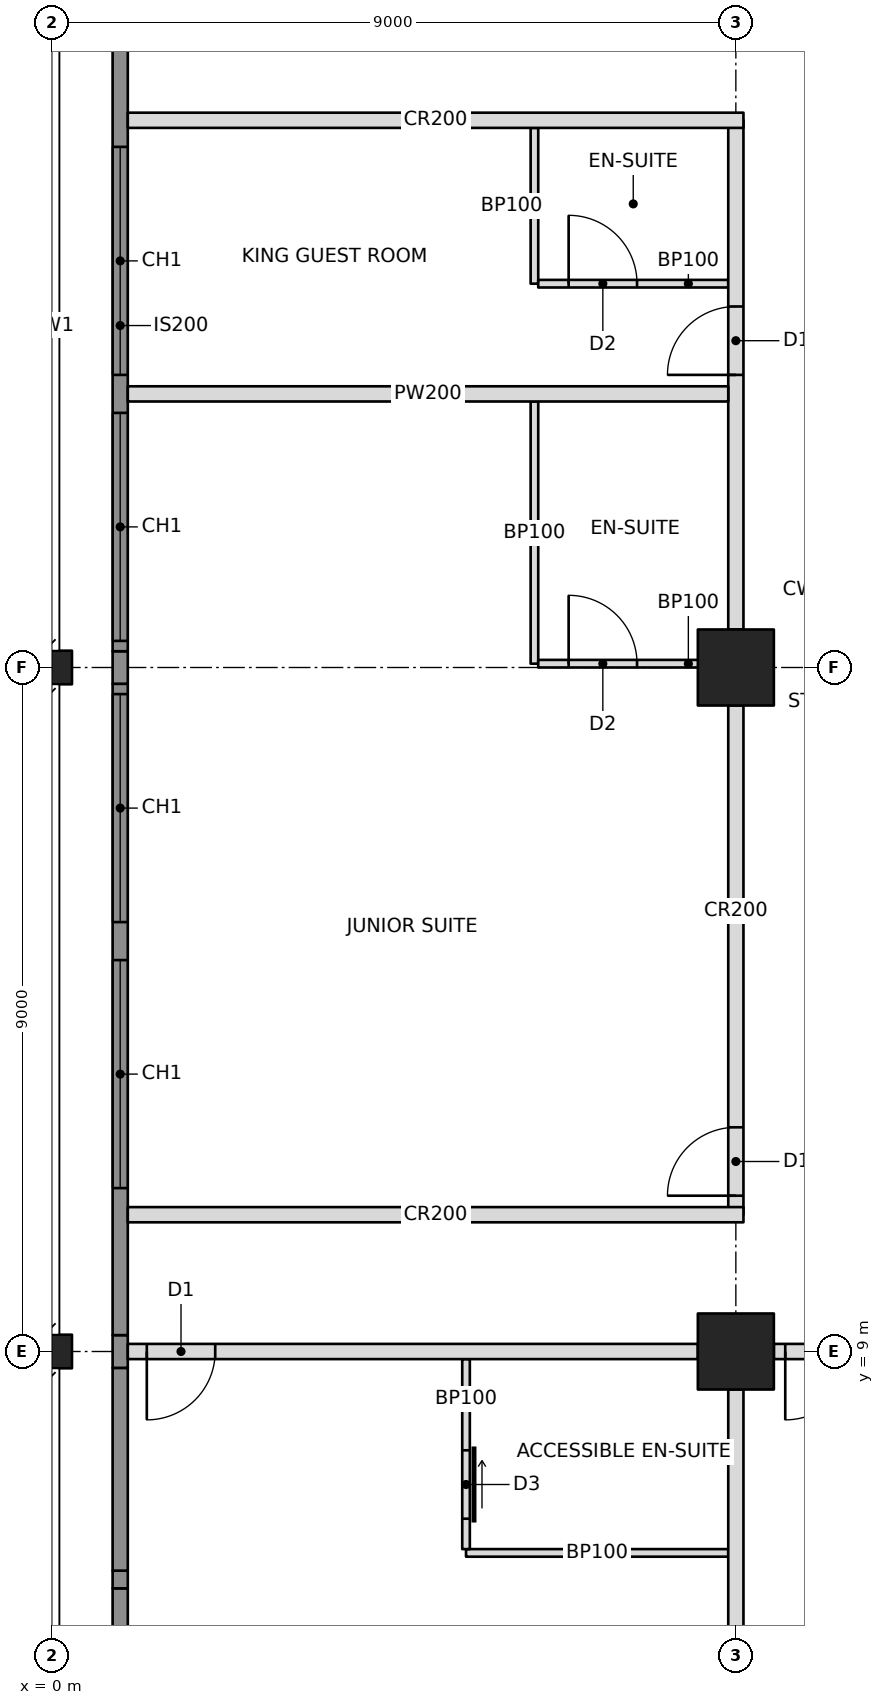
"""IFC4 building model, lengths in metres.
Left out: names, types, materials, properties, quantities, classifications, styles, units other than length and angle.
Written with IfcOpenShell. Run it as: python <this file> out.ifc"""

import sys

from ifc_helpers import new_model, si_unit, direction, frame, frame_2d, origin, origin_2d, place, context, subcontext, project, spatial, rectangle, hollow_rectangle, i_section, extrude, element, fill, save


model = new_model("IFC4")
c1 = context("Model", 3, precision=1e-05, world=origin(), true_north=direction((0.0, 1.0)))
c2 = subcontext(c1, "Body", "Model", "MODEL_VIEW")
j1 = project(units=[si_unit("LENGTHUNIT", "METRE"), si_unit("PLANEANGLEUNIT", "RADIAN")], contexts=[c1])
p1 = place(None, origin())
s1 = spatial("IfcSite", under=j1, at=p1, CompositionType="ELEMENT")
p2 = place(p1, origin())
s2 = spatial("IfcBuilding", under=s1, at=p2, CompositionType="ELEMENT")
p3 = place(p2, frame((0.0, 0.0, 152.0)))
s3 = spatial("IfcBuildingStorey", under=s2, at=p3, CompositionType="ELEMENT", Elevation=152.0)
for number, where, z_axis, x_axis in (
    (1, (0.0, 9.0, 0.0), (0.0, 0.0, 1.0), (0.0, 1.0, 0.0)),
    (2, (0.0, 18.0, 0.0), (0.0, 0.0, 1.0), (0.0, 1.0, 0.0)),
):
    element("IfcColumn", number, at=place(p3, frame(where, z_axis=z_axis, x_axis=x_axis)), inside=s3, PredefinedType="COLUMN", context=c2, shape_type="SweptSolid", body=[
        extrude(i_section(OverallWidth=0.442, OverallDepth=0.531, WebThickness=0.066, FlangeThickness=0.106, at=origin_2d()), origin(), (0.0, 0.0, 1.0), 3.4),
    ])
for number, where, z_axis, x_axis in (
    (3, (9.0, 9.0, 0.0), (0.0, 0.0, 1.0), (1.0, 0.0, 0.0)),
    (4, (9.0, 18.0, 0.0), (0.0, 0.0, 1.0), (1.0, 0.0, 0.0)),
):
    element("IfcColumn", number, at=place(p3, frame(where, z_axis=z_axis, x_axis=x_axis)), inside=s3, PredefinedType="COLUMN", context=c2, shape_type="SweptSolid", body=[
        extrude(hollow_rectangle(XDim=1.0, YDim=1.0, WallThickness=0.1, at=origin_2d()), origin(), (0.0, 0.0, 1.0), 3.4),
    ])
p4 = place(p3, frame((1.0, 9.0, 0.0), z_axis=(0.0, 0.0, 1.0), x_axis=(1.0, 0.0, 0.0)))
e5 = element("IfcWall", 5, at=p4, inside=s3, PredefinedType="PARTITIONING", context=c2, shape_type="SweptSolid", body=[
    extrude(rectangle(XDim=7.5, YDim=0.2, at=frame_2d((3.75, 0.0))), origin(), (0.0, 0.0, 1.0), 2.21),
])
p5 = place(p4, frame((0.25, 0.0, 0.0)))
e6 = element("IfcOpeningElement", 6, at=p5, cuts=e5, PredefinedType="OPENING", context=c2, shape_type="SweptSolid", body=[
    extrude(rectangle(XDim=0.9, YDim=2.1, at=frame_2d((0.45, 1.05))), frame((0.0, 0.11, 0.0), z_axis=(0.0, -1.0, 0.0), x_axis=(1.0, 0.0, 0.0)), (0.0, 0.0, 1.0), 0.22),
])
p6 = place(p3, frame((9.5, 9.0, 0.0), z_axis=(0.0, 0.0, 1.0), x_axis=(1.0, 0.0, 0.0)))
e7 = element("IfcWall", 7, at=p6, inside=s3, PredefinedType="PARTITIONING", context=c2, shape_type="SweptSolid", body=[
    extrude(rectangle(XDim=8.0, YDim=0.2, at=frame_2d((4.0, 0.0))), origin(), (0.0, 0.0, 1.0), 2.21),
])
p7 = place(p6, frame((0.15, 0.0, 0.0)))
e8 = element("IfcOpeningElement", 8, at=p7, cuts=e7, PredefinedType="OPENING", context=c2, shape_type="SweptSolid", body=[
    extrude(rectangle(XDim=0.9, YDim=2.1, at=frame_2d((0.45, 1.05))), frame((0.0, 0.11, 0.0), z_axis=(0.0, -1.0, 0.0), x_axis=(1.0, 0.0, 0.0)), (0.0, 0.0, 1.0), 0.22),
])
p8 = place(p3, frame((9.0, 10.8, 0.0), z_axis=(0.0, 0.0, 1.0), x_axis=(0.0, 1.0, 0.0)))
e9 = element("IfcWall", 9, at=p8, inside=s3, PredefinedType="PARTITIONING", context=c2, shape_type="SweptSolid", body=[
    extrude(rectangle(XDim=6.7, YDim=0.2, at=frame_2d((3.35, 0.0))), origin(), (0.0, 0.0, 1.0), 2.21),
])
p9 = place(p8, frame((0.25, 0.0, 0.0)))
e10 = element("IfcOpeningElement", 10, at=p9, cuts=e9, PredefinedType="OPENING", context=c2, shape_type="SweptSolid", body=[
    extrude(rectangle(XDim=0.9, YDim=2.1, at=frame_2d((0.45, 1.05))), frame((0.0, 0.11, 0.0), z_axis=(0.0, -1.0, 0.0), x_axis=(1.0, 0.0, 0.0)), (0.0, 0.0, 1.0), 0.22),
])
p10 = place(p3, frame((9.0, 18.5, 0.0), z_axis=(0.0, 0.0, 1.0), x_axis=(0.0, 1.0, 0.0)))
e11 = element("IfcWall", 11, at=p10, inside=s3, PredefinedType="PARTITIONING", context=c2, shape_type="SweptSolid", body=[
    extrude(rectangle(XDim=6.7, YDim=0.2, at=frame_2d((3.35, 0.0))), origin(), (0.0, 0.0, 1.0), 2.21),
])
p11 = place(p10, frame((3.35, 0.0, 0.0)))
e12 = element("IfcOpeningElement", 12, at=p11, cuts=e11, PredefinedType="OPENING", context=c2, shape_type="SweptSolid", body=[
    extrude(rectangle(XDim=0.9, YDim=2.1, at=frame_2d((0.45, 1.05))), frame((0.0, 0.11, 0.0), z_axis=(0.0, -1.0, 0.0), x_axis=(1.0, 0.0, 0.0)), (0.0, 0.0, 1.0), 0.22),
])
for number, where, z_axis, x_axis in (
    (13, (1.0, 10.8, 0.0), (0.0, 0.0, 1.0), (1.0, 0.0, 0.0)),
    (14, (1.0, 25.2, 0.0), (0.0, 0.0, 1.0), (1.0, 0.0, 0.0)),
):
    element("IfcWall", number, at=place(p3, frame(where, z_axis=z_axis, x_axis=x_axis)), inside=s3, PredefinedType="PARTITIONING", context=c2, shape_type="SweptSolid", body=[
        extrude(rectangle(XDim=8.1, YDim=0.2, at=frame_2d((4.05, 0.0))), origin(), (0.0, 0.0, 1.0), 2.21),
    ])
p12 = place(p3, frame((9.0, 8.5, 0.0), z_axis=(0.0, 0.0, 1.0), x_axis=(0.0, -1.0, 0.0)))
e15 = element("IfcWall", 15, at=p12, inside=s3, PredefinedType="PARTITIONING", context=c2, shape_type="SweptSolid", body=[
    extrude(rectangle(XDim=7.5, YDim=0.2, at=frame_2d((3.75, 0.0))), origin(), (0.0, 0.0, 1.0), 2.21),
])
p13 = place(p3, frame((5.45, 6.35, 0.0), z_axis=(0.0, 0.0, 1.0), x_axis=(1.0, 0.0, 0.0)))
e16 = element("IfcWall", 16, at=p13, inside=s3, PredefinedType="PARTITIONING", context=c2, shape_type="SweptSolid", body=[
    extrude(rectangle(XDim=3.45, YDim=0.1, at=frame_2d((1.725, 0.0))), origin(), (0.0, 0.0, 1.0), 2.21),
])
p14 = place(p3, frame((5.45, 8.9, 0.0), z_axis=(0.0, 0.0, 1.0), x_axis=(0.0, -1.0, 0.0)))
e17 = element("IfcWall", 17, at=p14, inside=s3, PredefinedType="PARTITIONING", context=c2, shape_type="SweptSolid", body=[
    extrude(rectangle(XDim=2.5, YDim=0.1, at=frame_2d((1.25, 0.0))), origin(), (0.0, 0.0, 1.0), 2.21),
])
p15 = place(p14, frame((1.2, 0.0, 0.0)))
e18 = element("IfcOpeningElement", 18, at=p15, cuts=e17, PredefinedType="OPENING", context=c2, shape_type="SweptSolid", body=[
    extrude(rectangle(XDim=0.9, YDim=2.1, at=frame_2d((0.45, 1.05))), frame((0.0, 0.06, 0.0), z_axis=(0.0, -1.0, 0.0), x_axis=(1.0, 0.0, 0.0)), (0.0, 0.0, 1.0), 0.12),
])
p16 = place(p3, frame((8.9, 21.6, 0.0), z_axis=(0.0, 0.0, 1.0), x_axis=(-1.0, 0.0, 0.0)))
e19 = element("IfcWall", 19, at=p16, inside=s3, PredefinedType="PARTITIONING", context=c2, shape_type="SweptSolid", body=[
    extrude(rectangle(XDim=7.9, YDim=0.2, at=frame_2d((3.95, 0.0))), origin(), (0.0, 0.0, 1.0), 2.21),
])
p17 = place(p3, frame((6.35, 18.05, 0.0), z_axis=(0.0, 0.0, 1.0), x_axis=(0.0, 1.0, 0.0)))
e20 = element("IfcWall", 20, at=p17, inside=s3, PredefinedType="PARTITIONING", context=c2, shape_type="SweptSolid", body=[
    extrude(rectangle(XDim=3.45, YDim=0.1, at=frame_2d((1.725, 0.0))), origin(), (0.0, 0.0, 1.0), 2.202),
])
p18 = place(p3, frame((8.9, 18.05, 0.0), z_axis=(0.0, 0.0, 1.0), x_axis=(-1.0, 0.0, 0.0)))
e21 = element("IfcWall", 21, at=p18, inside=s3, PredefinedType="PARTITIONING", context=c2, shape_type="SweptSolid", body=[
    extrude(rectangle(XDim=2.5, YDim=0.1, at=frame_2d((1.25, 0.0))), origin(), (0.0, 0.0, 1.0), 2.203),
])
p19 = place(p18, frame((1.2, 0.0, 0.0)))
e22 = element("IfcOpeningElement", 22, at=p19, cuts=e21, PredefinedType="OPENING", context=c2, shape_type="SweptSolid", body=[
    extrude(rectangle(XDim=0.9, YDim=2.1, at=frame_2d((0.45, 1.05))), frame((0.0, 0.06, 0.0), z_axis=(0.0, -1.0, 0.0), x_axis=(1.0, 0.0, 0.0)), (0.0, 0.0, 1.0), 0.12),
])
p20 = place(p3, frame((6.35, 23.05, 0.0), z_axis=(0.0, 0.0, 1.0), x_axis=(0.0, 1.0, 0.0)))
e23 = element("IfcWall", 23, at=p20, inside=s3, PredefinedType="PARTITIONING", context=c2, shape_type="SweptSolid", body=[
    extrude(rectangle(XDim=2.05, YDim=0.1, at=frame_2d((1.025, 0.0))), origin(), (0.0, 0.0, 1.0), 3.15),
])
p21 = place(p3, frame((8.9, 23.05, 0.0), z_axis=(0.0, 0.0, 1.0), x_axis=(-1.0, 0.0, 0.0)))
e24 = element("IfcWall", 24, at=p21, inside=s3, PredefinedType="PARTITIONING", context=c2, shape_type="SweptSolid", body=[
    extrude(rectangle(XDim=2.5, YDim=0.1, at=frame_2d((1.25, 0.0))), origin(), (0.0, 0.0, 1.0), 2.21),
])
p22 = place(p21, frame((1.2, 0.0, 0.0)))
e25 = element("IfcOpeningElement", 25, at=p22, cuts=e24, PredefinedType="OPENING", context=c2, shape_type="SweptSolid", body=[
    extrude(rectangle(XDim=0.9, YDim=2.1, at=frame_2d((0.45, 1.05))), frame((0.0, 0.06, 0.0), z_axis=(0.0, -1.0, 0.0), x_axis=(1.0, 0.0, 0.0)), (0.0, 0.0, 1.0), 0.12),
])
p23 = place(p3, frame((0.9, 3.116, 0.0), z_axis=(0.0, 0.0, 1.0), x_axis=(0.0, 1.0, 0.0)))
e26 = element("IfcWall", 26, at=p23, inside=s3, PredefinedType="SOLIDWALL", context=c2, shape_type="SweptSolid", body=[
    extrude(rectangle(XDim=2.768, YDim=0.2, at=frame_2d((1.384, 0.0))), origin(), (0.0, 0.0, 1.0), 3.15),
])
p24 = place(p3, frame((0.9, 5.884, 0.0), z_axis=(0.0, 0.0, 1.0), x_axis=(0.0, 1.0, 0.0)))
e27 = element("IfcWall", 27, at=p24, inside=s3, PredefinedType="SOLIDWALL", context=c2, shape_type="SweptSolid", body=[
    extrude(rectangle(XDim=0.232, YDim=0.2, at=frame_2d((0.116, 0.0))), origin(), (0.0, 0.0, 1.0), 2.542),
])
p25 = place(p3, frame((0.9, 6.116, 0.0), z_axis=(0.0, 0.0, 1.0), x_axis=(0.0, 1.0, 0.0)))
e28 = element("IfcWall", 28, at=p25, inside=s3, PredefinedType="SOLIDWALL", context=c2, shape_type="SweptSolid", body=[
    extrude(rectangle(XDim=2.668, YDim=0.2, at=frame_2d((1.334, 0.0))), origin(), (0.0, 0.0, 1.0), 3.15),
])
p26 = place(p3, frame((0.9, 8.785, 0.0), z_axis=(0.0, 0.0, 1.0), x_axis=(0.0, 1.0, 0.0)))
e29 = element("IfcWall", 29, at=p26, inside=s3, PredefinedType="SOLIDWALL", context=c2, shape_type="SweptSolid", body=[
    extrude(rectangle(XDim=0.431, YDim=0.2, at=frame_2d((0.215, 0.0))), origin(), (0.0, 0.0, 1.0), 2.21),
])
p27 = place(p3, frame((0.9, 9.215, 0.0), z_axis=(0.0, 0.0, 1.0), x_axis=(0.0, 1.0, 0.0)))
e30 = element("IfcWall", 30, at=p27, inside=s3, PredefinedType="SOLIDWALL", context=c2, shape_type="SweptSolid", body=[
    extrude(rectangle(XDim=8.571, YDim=0.2, at=frame_2d((4.285, 0.0))), origin(), (0.0, 0.0, 1.0), 3.15),
])
p28 = place(p27, frame((1.935, 0.0, 0.6)))
e31 = element("IfcOpeningElement", 31, at=p28, cuts=e30, PredefinedType="OPENING", context=c2, shape_type="SweptSolid", body=[
    extrude(rectangle(XDim=3.0, YDim=2.2, at=frame_2d((1.5, 1.1))), frame((0.0, 0.11, 0.0), z_axis=(0.0, -1.0, 0.0), x_axis=(1.0, 0.0, 0.0)), (0.0, 0.0, 1.0), 0.22),
])
p29 = place(p27, frame((5.435, 0.0, 0.6)))
e32 = element("IfcOpeningElement", 32, at=p29, cuts=e30, PredefinedType="OPENING", context=c2, shape_type="SweptSolid", body=[
    extrude(rectangle(XDim=3.0, YDim=2.2, at=frame_2d((1.5, 1.1))), frame((0.0, 0.11, 0.0), z_axis=(0.0, -1.0, 0.0), x_axis=(1.0, 0.0, 0.0)), (0.0, 0.0, 1.0), 0.22),
])
p30 = place(p3, frame((0.9, 17.786, 0.0), z_axis=(0.0, 0.0, 1.0), x_axis=(0.0, 1.0, 0.0)))
e33 = element("IfcWall", 33, at=p30, inside=s3, PredefinedType="SOLIDWALL", context=c2, shape_type="SweptSolid", body=[
    extrude(rectangle(XDim=0.428, YDim=0.2, at=frame_2d((0.214, 0.0))), origin(), (0.0, 0.0, 1.0), 2.202),
])
p31 = place(p3, frame((0.9, 18.214, 0.0), z_axis=(0.0, 0.0, 1.0), x_axis=(0.0, 1.0, 0.0)))
e34 = element("IfcWall", 34, at=p31, inside=s3, PredefinedType="SOLIDWALL", context=c2, shape_type="SweptSolid", body=[
    extrude(rectangle(XDim=8.571, YDim=0.2, at=frame_2d((4.285, 0.0))), origin(), (0.0, 0.0, 1.0), 3.15),
])
p32 = place(p31, frame((0.136, 0.0, 0.6)))
e35 = element("IfcOpeningElement", 35, at=p32, cuts=e34, PredefinedType="OPENING", context=c2, shape_type="SweptSolid", body=[
    extrude(rectangle(XDim=3.0, YDim=2.2, at=frame_2d((1.5, 1.1))), frame((0.0, 0.11, 0.0), z_axis=(0.0, -1.0, 0.0), x_axis=(1.0, 0.0, 0.0)), (0.0, 0.0, 1.0), 0.22),
])
p33 = place(p31, frame((3.636, 0.0, 0.6)))
e36 = element("IfcOpeningElement", 36, at=p33, cuts=e34, PredefinedType="OPENING", context=c2, shape_type="SweptSolid", body=[
    extrude(rectangle(XDim=3.0, YDim=2.2, at=frame_2d((1.5, 1.1))), frame((0.0, 0.11, 0.0), z_axis=(0.0, -1.0, 0.0), x_axis=(1.0, 0.0, 0.0)), (0.0, 0.0, 1.0), 0.22),
])
p34 = place(p28, origin())
e37 = element("IfcWindow", 37, at=p34, inside=s3, PartitioningType="TRIPLE_PANEL_VERTICAL", PredefinedType="WINDOW", context=c2, shape_type="SweptSolid", body=[
    extrude(rectangle(XDim=3.0, YDim=2.2, at=frame_2d((1.5, 1.1))), frame((0.0, 0.03, 0.0), z_axis=(0.0, -1.0, 0.0), x_axis=(1.0, 0.0, 0.0)), (0.0, 0.0, 1.0), 0.06),
])
fill(e31, e37)
p35 = place(p29, origin())
e38 = element("IfcWindow", 38, at=p35, inside=s3, PartitioningType="TRIPLE_PANEL_VERTICAL", PredefinedType="WINDOW", context=c2, shape_type="SweptSolid", body=[
    extrude(rectangle(XDim=3.0, YDim=2.2, at=frame_2d((1.5, 1.1))), frame((0.0, 0.03, 0.0), z_axis=(0.0, -1.0, 0.0), x_axis=(1.0, 0.0, 0.0)), (0.0, 0.0, 1.0), 0.06),
])
fill(e32, e38)
p36 = place(p32, origin())
e39 = element("IfcWindow", 39, at=p36, inside=s3, PartitioningType="TRIPLE_PANEL_VERTICAL", PredefinedType="WINDOW", context=c2, shape_type="SweptSolid", body=[
    extrude(rectangle(XDim=3.0, YDim=2.2, at=frame_2d((1.5, 1.1))), frame((0.0, 0.03, 0.0), z_axis=(0.0, -1.0, 0.0), x_axis=(1.0, 0.0, 0.0)), (0.0, 0.0, 1.0), 0.06),
])
fill(e35, e39)
p37 = place(p33, origin())
e40 = element("IfcWindow", 40, at=p37, inside=s3, PartitioningType="TRIPLE_PANEL_VERTICAL", PredefinedType="WINDOW", context=c2, shape_type="SweptSolid", body=[
    extrude(rectangle(XDim=3.0, YDim=2.2, at=frame_2d((1.5, 1.1))), frame((0.0, 0.03, 0.0), z_axis=(0.0, -1.0, 0.0), x_axis=(1.0, 0.0, 0.0)), (0.0, 0.0, 1.0), 0.06),
])
fill(e36, e40)
p38 = place(p15, origin())
e41 = element("IfcDoor", 41, at=p38, inside=s3, OperationType="SLIDING_TO_LEFT", PredefinedType="DOOR", context=c2, shape_type="SweptSolid", body=[
    extrude(rectangle(XDim=0.9, YDim=2.1, at=frame_2d((0.45, 1.05))), frame((0.0, 0.025, 0.0), z_axis=(0.0, -1.0, 0.0), x_axis=(1.0, 0.0, 0.0)), (0.0, 0.0, 1.0), 0.05),
])
fill(e18, e41)
p39 = place(p5, frame((0.9, 0.0, 0.0), z_axis=(0.0, 0.0, 1.0), x_axis=(-1.0, 0.0, 0.0)))
e42 = element("IfcDoor", 42, at=p39, inside=s3, OperationType="SINGLE_SWING_RIGHT", PredefinedType="DOOR", context=c2, shape_type="SweptSolid", body=[
    extrude(rectangle(XDim=0.9, YDim=2.1, at=frame_2d((0.45, 1.05))), frame((0.0, 0.025, 0.0), z_axis=(0.0, -1.0, 0.0), x_axis=(1.0, 0.0, 0.0)), (0.0, 0.0, 1.0), 0.05),
])
fill(e6, e42)
p40 = place(p7, frame((0.9, 0.0, 0.0), z_axis=(0.0, 0.0, 1.0), x_axis=(-1.0, 0.0, 0.0)))
e43 = element("IfcDoor", 43, at=p40, inside=s3, OperationType="SINGLE_SWING_RIGHT", PredefinedType="DOOR", context=c2, shape_type="SweptSolid", body=[
    extrude(rectangle(XDim=0.9, YDim=2.1, at=frame_2d((0.45, 1.05))), frame((0.0, 0.025, 0.0), z_axis=(0.0, -1.0, 0.0), x_axis=(1.0, 0.0, 0.0)), (0.0, 0.0, 1.0), 0.05),
])
fill(e8, e43)
p41 = place(p19, frame((0.9, 0.0, 0.0), z_axis=(0.0, 0.0, 1.0), x_axis=(-1.0, 0.0, 0.0)))
e44 = element("IfcDoor", 44, at=p41, inside=s3, OperationType="SINGLE_SWING_LEFT", PredefinedType="DOOR", context=c2, shape_type="SweptSolid", body=[
    extrude(rectangle(XDim=0.9, YDim=2.1, at=frame_2d((0.45, 1.05))), frame((0.0, 0.025, 0.0), z_axis=(0.0, -1.0, 0.0), x_axis=(1.0, 0.0, 0.0)), (0.0, 0.0, 1.0), 0.05),
])
fill(e22, e44)
p42 = place(p9, origin())
e45 = element("IfcDoor", 45, at=p42, inside=s3, OperationType="SINGLE_SWING_LEFT", PredefinedType="DOOR", context=c2, shape_type="SweptSolid", body=[
    extrude(rectangle(XDim=0.9, YDim=2.1, at=frame_2d((0.45, 1.05))), frame((0.0, 0.025, 0.0), z_axis=(0.0, -1.0, 0.0), x_axis=(1.0, 0.0, 0.0)), (0.0, 0.0, 1.0), 0.05),
])
fill(e10, e45)
p43 = place(p22, frame((0.9, 0.0, 0.0), z_axis=(0.0, 0.0, 1.0), x_axis=(-1.0, 0.0, 0.0)))
e46 = element("IfcDoor", 46, at=p43, inside=s3, OperationType="SINGLE_SWING_LEFT", PredefinedType="DOOR", context=c2, shape_type="SweptSolid", body=[
    extrude(rectangle(XDim=0.9, YDim=2.1, at=frame_2d((0.45, 1.05))), frame((0.0, 0.025, 0.0), z_axis=(0.0, -1.0, 0.0), x_axis=(1.0, 0.0, 0.0)), (0.0, 0.0, 1.0), 0.05),
])
fill(e25, e46)
p44 = place(p11, origin())
e47 = element("IfcDoor", 47, at=p44, inside=s3, OperationType="SINGLE_SWING_LEFT", PredefinedType="DOOR", context=c2, shape_type="SweptSolid", body=[
    extrude(rectangle(XDim=0.9, YDim=2.1, at=frame_2d((0.45, 1.05))), frame((0.0, 0.025, 0.0), z_axis=(0.0, -1.0, 0.0), x_axis=(1.0, 0.0, 0.0)), (0.0, 0.0, 1.0), 0.05),
])
fill(e12, e47)
save(model, sys.argv[1])
